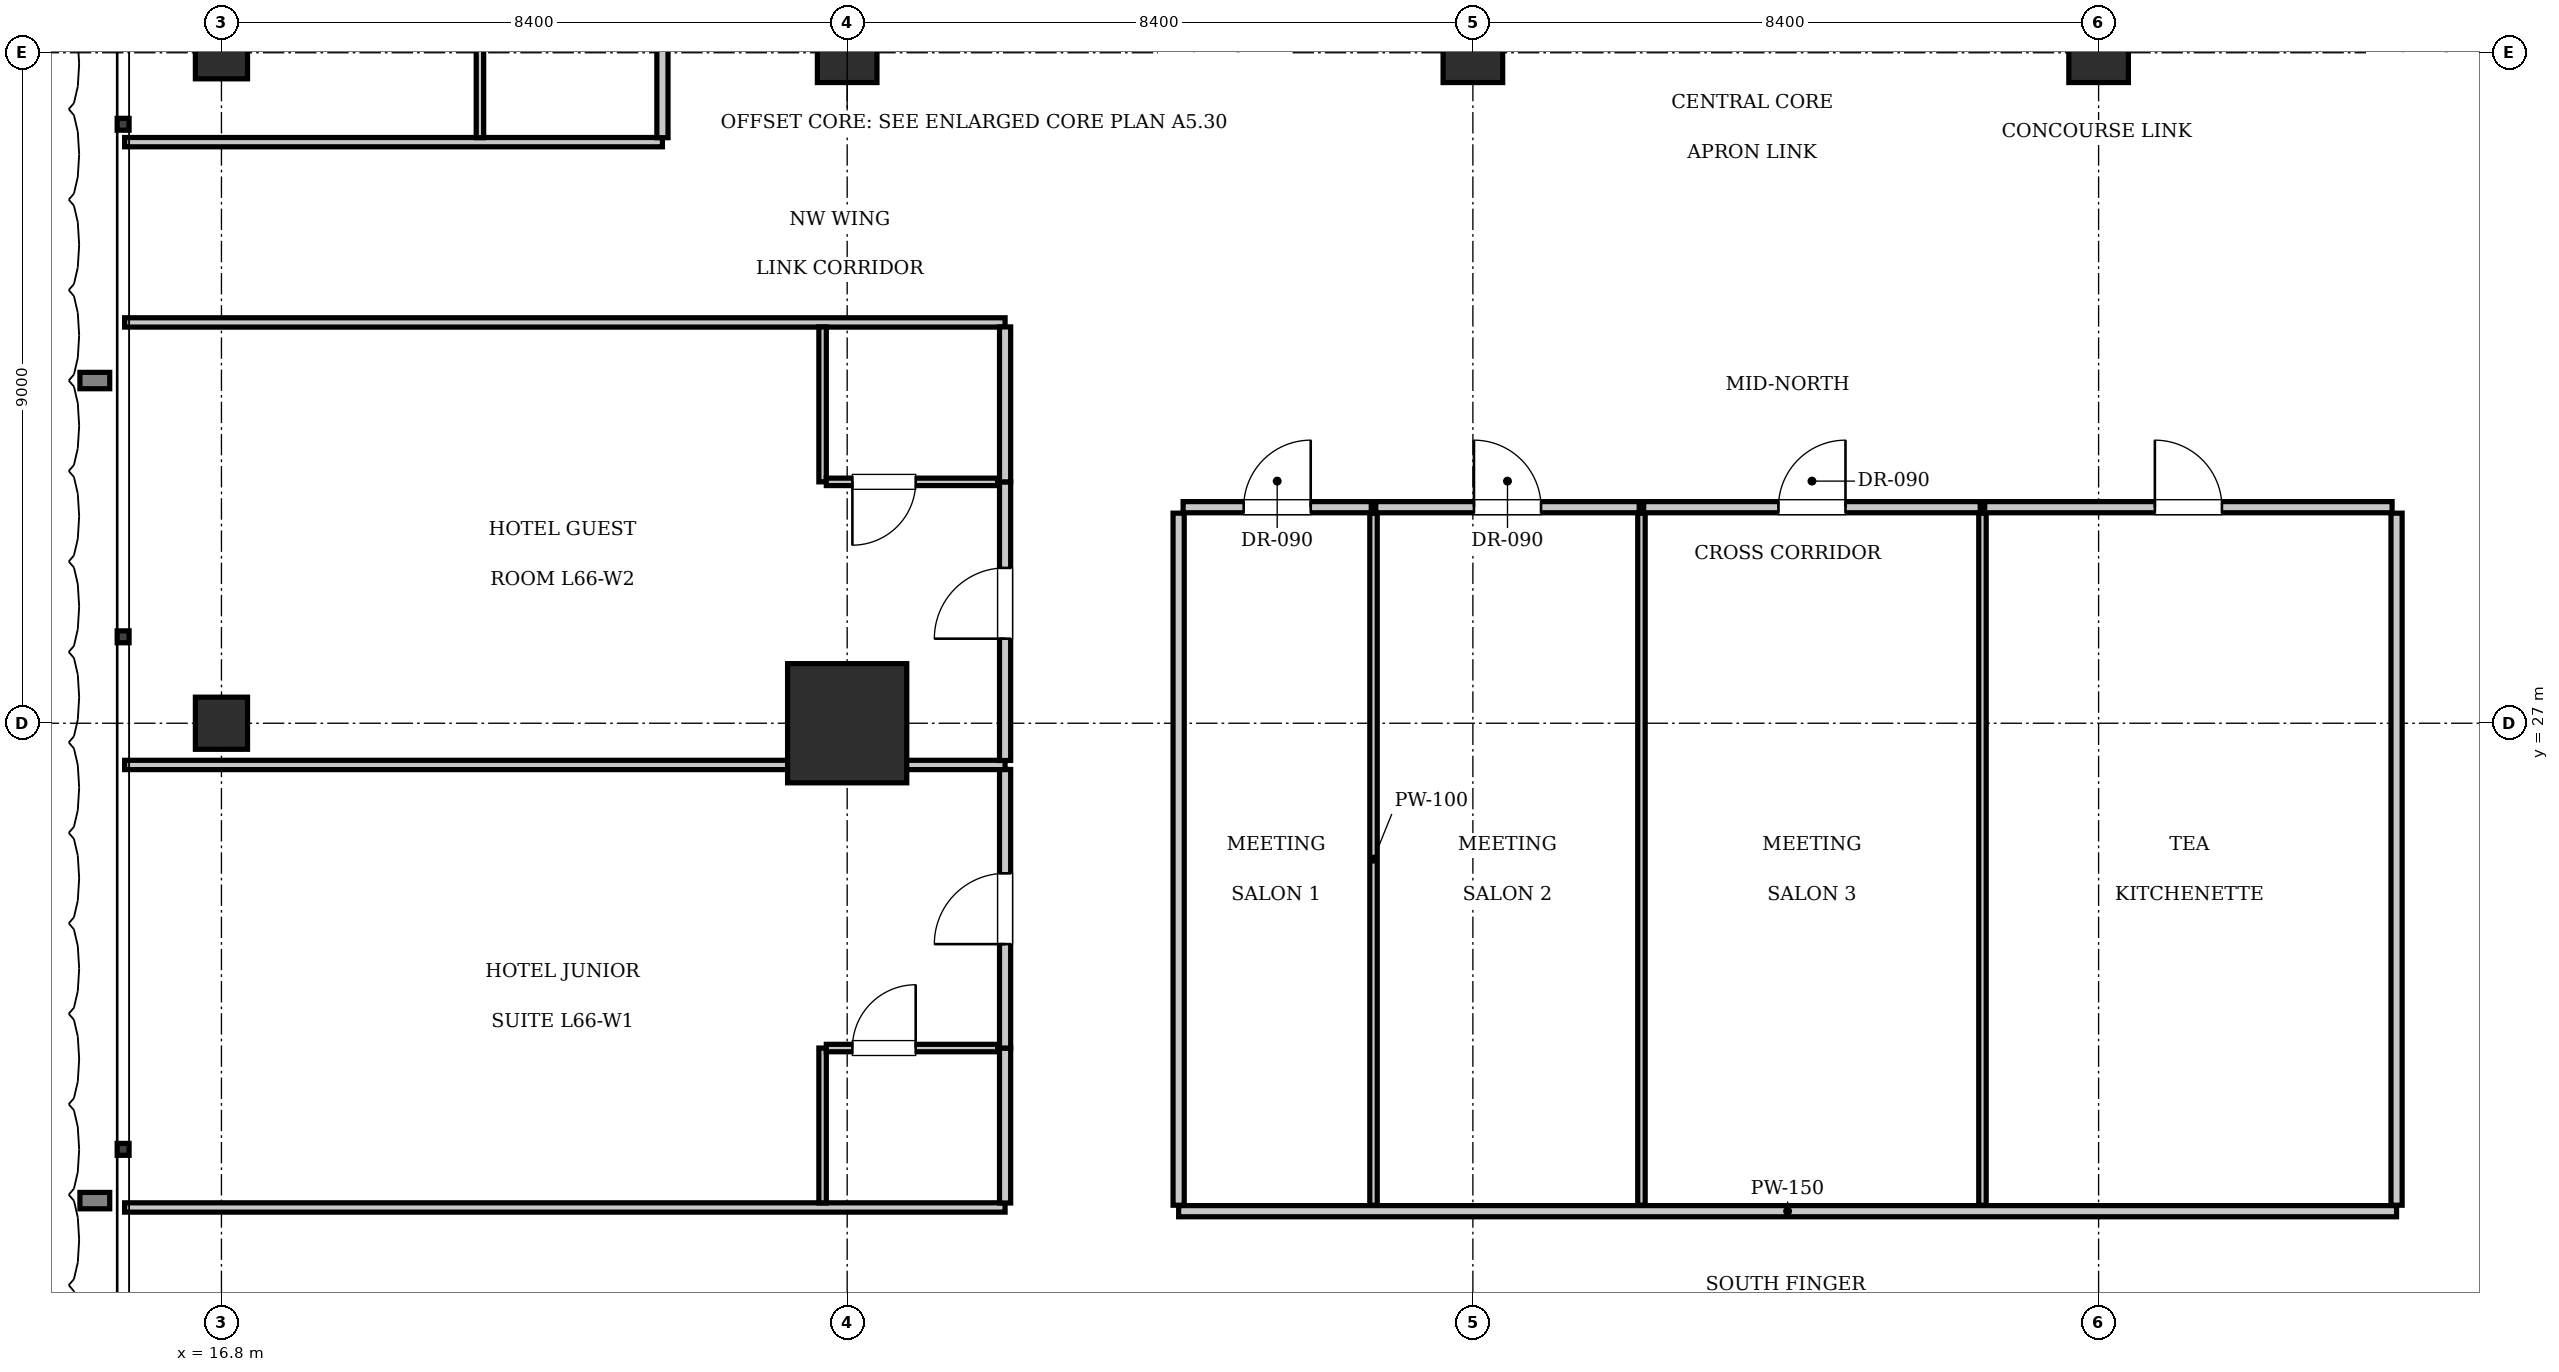
"""IFC4 building model, lengths in metres.
Left out: names, types, materials, properties, quantities, classifications, styles, units other than length and angle.
Written with IfcOpenShell. Run it as: python <this file> out.ifc"""

import sys

from ifc_helpers import new_model, si_unit, direction, frame, frame_2d, origin, origin_2d, place, context, subcontext, project, spatial, rectangle, extrude, element, fill, save


model = new_model("IFC4")
c1 = context("Model", 3, precision=1e-05, world=origin(), true_north=direction((0.0, 1.0)))
c2 = subcontext(c1, "Body", "Model", "MODEL_VIEW")
j1 = project(units=[si_unit("LENGTHUNIT", "METRE"), si_unit("PLANEANGLEUNIT", "RADIAN")], contexts=[c1])
p1 = place(None, origin())
s1 = spatial("IfcSite", under=j1, at=p1, CompositionType="ELEMENT")
p2 = place(p1, origin())
s2 = spatial("IfcBuilding", under=s1, at=p2, CompositionType="ELEMENT")
p3 = place(p2, frame((0.0, 0.0, 270.2)))
s3 = spatial("IfcBuildingStorey", under=s2, at=p3, CompositionType="ELEMENT", Elevation=270.2)
p4 = place(p3, frame((25.2, 27.0, 0.0), z_axis=(0.0, 0.0, 1.0), x_axis=(1.0, 0.0, 0.0)))
e1 = element("IfcColumn", 1, at=p4, inside=s3, PredefinedType="COLUMN", context=c2, shape_type="SweptSolid", body=[
    extrude(rectangle(XDim=1.6, YDim=1.6, at=origin_2d()), origin(), (0.0, 0.0, 1.0), 3.85),
])
for number, where, z_axis, x_axis in (
    (2, (25.2, 36.0, 0.0), (0.0, 0.0, 1.0), (1.0, 0.0, 0.0)),
    (3, (33.6, 36.0, 0.0), (0.0, 0.0, 1.0), (1.0, 0.0, 0.0)),
    (4, (42.0, 36.0, 0.0), (0.0, 0.0, 1.0), (1.0, 0.0, 0.0)),
):
    element("IfcColumn", number, at=place(p3, frame(where, z_axis=z_axis, x_axis=x_axis)), inside=s3, PredefinedType="COLUMN", context=c2, shape_type="SweptSolid", body=[
        extrude(rectangle(XDim=0.8, YDim=0.8, at=origin_2d()), origin(), (0.0, 0.0, 1.0), 3.85),
    ])
for number, where, z_axis, x_axis in (
    (5, (16.8, 27.0, 0.0), (0.0, 0.0, 1.0), (1.0, 0.0, 0.0)),
    (6, (16.8, 36.0, 0.0), (0.0, 0.0, 1.0), (1.0, 0.0, 0.0)),
):
    element("IfcColumn", number, at=place(p3, frame(where, z_axis=z_axis, x_axis=x_axis)), inside=s3, PredefinedType="COLUMN", context=c2, shape_type="SweptSolid", body=[
        extrude(rectangle(XDim=0.7, YDim=0.7, at=origin_2d()), origin(), (0.0, 0.0, 1.0), 3.85),
    ])
p5 = place(p3, frame((29.65, 20.45, 0.0), z_axis=(0.0, 0.0, 1.0), x_axis=(1.0, 0.0, 0.0)))
e7 = element("IfcWall", 7, at=p5, inside=s3, PredefinedType="PARTITIONING", context=c2, shape_type="SweptSolid", body=[
    extrude(rectangle(XDim=16.35, YDim=0.15, at=frame_2d((8.175, 0.0))), origin(), (0.0, 0.0, 1.0), 3.61),
])
for number, where, z_axis, x_axis in (
    (8, (29.65, 20.53, 0.0), (0.0, 0.0, 1.0), (0.0, 1.0, 0.0)),
    (9, (46.0, 20.53, 0.0), (0.0, 0.0, 1.0), (0.0, 1.0, 0.0)),
):
    element("IfcWall", number, at=place(p3, frame(where, z_axis=z_axis, x_axis=x_axis)), inside=s3, PredefinedType="PARTITIONING", context=c2, shape_type="SweptSolid", body=[
        extrude(rectangle(XDim=9.29, YDim=0.15, at=frame_2d((4.645, 0.0))), origin(), (0.0, 0.0, 1.0), 3.61),
    ])
p6 = place(p3, frame((29.71, 29.9, 0.0), z_axis=(0.0, 0.0, 1.0), x_axis=(1.0, 0.0, 0.0)))
e10 = element("IfcWall", 10, at=p6, inside=s3, PredefinedType="PARTITIONING", context=c2, shape_type="SweptSolid", body=[
    extrude(rectangle(XDim=2.526, YDim=0.15, at=frame_2d((1.263, 0.0))), origin(), (0.0, 0.0, 1.0), 3.61),
])
p7 = place(p6, frame((0.813, 0.0, 0.0)))
e11 = element("IfcOpeningElement", 11, at=p7, cuts=e10, PredefinedType="OPENING", context=c2, shape_type="SweptSolid", body=[
    extrude(rectangle(XDim=0.9, YDim=2.1, at=frame_2d((0.45, 1.05))), frame((0.0, 0.085, 0.0), z_axis=(0.0, -1.0, 0.0), x_axis=(1.0, 0.0, 0.0)), (0.0, 0.0, 1.0), 0.17),
])
p8 = place(p3, frame((32.266, 20.53, 0.0), z_axis=(0.0, 0.0, 1.0), x_axis=(0.0, 1.0, 0.0)))
e12 = element("IfcWall", 12, at=p8, inside=s3, PredefinedType="PARTITIONING", context=c2, shape_type="SweptSolid", body=[
    extrude(rectangle(XDim=9.29, YDim=0.1, at=frame_2d((4.645, 0.0))), origin(), (0.0, 0.0, 1.0), 3.61),
])
p9 = place(p3, frame((32.296, 29.9, 0.0), z_axis=(0.0, 0.0, 1.0), x_axis=(1.0, 0.0, 0.0)))
e13 = element("IfcWall", 13, at=p9, inside=s3, PredefinedType="PARTITIONING", context=c2, shape_type="SweptSolid", body=[
    extrude(rectangle(XDim=3.537, YDim=0.15, at=frame_2d((1.769, 0.0))), origin(), (0.0, 0.0, 1.0), 3.61),
])
p10 = place(p9, frame((1.319, 0.0, 0.0)))
e14 = element("IfcOpeningElement", 14, at=p10, cuts=e13, PredefinedType="OPENING", context=c2, shape_type="SweptSolid", body=[
    extrude(rectangle(XDim=0.9, YDim=2.1, at=frame_2d((0.45, 1.05))), frame((0.0, 0.085, 0.0), z_axis=(0.0, -1.0, 0.0), x_axis=(1.0, 0.0, 0.0)), (0.0, 0.0, 1.0), 0.17),
])
p11 = place(p3, frame((35.863, 20.53, 0.0), z_axis=(0.0, 0.0, 1.0), x_axis=(0.0, 1.0, 0.0)))
e15 = element("IfcWall", 15, at=p11, inside=s3, PredefinedType="PARTITIONING", context=c2, shape_type="SweptSolid", body=[
    extrude(rectangle(XDim=9.29, YDim=0.1, at=frame_2d((4.645, 0.0))), origin(), (0.0, 0.0, 1.0), 3.61),
])
p12 = place(p3, frame((35.893, 29.9, 0.0), z_axis=(0.0, 0.0, 1.0), x_axis=(1.0, 0.0, 0.0)))
e16 = element("IfcWall", 16, at=p12, inside=s3, PredefinedType="PARTITIONING", context=c2, shape_type="SweptSolid", body=[
    extrude(rectangle(XDim=4.518, YDim=0.15, at=frame_2d((2.259, 0.0))), origin(), (0.0, 0.0, 1.0), 3.61),
])
p13 = place(p12, frame((1.809, 0.0, 0.0)))
e17 = element("IfcOpeningElement", 17, at=p13, cuts=e16, PredefinedType="OPENING", context=c2, shape_type="SweptSolid", body=[
    extrude(rectangle(XDim=0.9, YDim=2.1, at=frame_2d((0.45, 1.05))), frame((0.0, 0.085, 0.0), z_axis=(0.0, -1.0, 0.0), x_axis=(1.0, 0.0, 0.0)), (0.0, 0.0, 1.0), 0.17),
])
p14 = place(p3, frame((40.441, 20.53, 0.0), z_axis=(0.0, 0.0, 1.0), x_axis=(0.0, 1.0, 0.0)))
e18 = element("IfcWall", 18, at=p14, inside=s3, PredefinedType="PARTITIONING", context=c2, shape_type="SweptSolid", body=[
    extrude(rectangle(XDim=9.29, YDim=0.1, at=frame_2d((4.645, 0.0))), origin(), (0.0, 0.0, 1.0), 3.61),
])
p15 = place(p3, frame((40.471, 29.9, 0.0), z_axis=(0.0, 0.0, 1.0), x_axis=(1.0, 0.0, 0.0)))
e19 = element("IfcWall", 19, at=p15, inside=s3, PredefinedType="PARTITIONING", context=c2, shape_type="SweptSolid", body=[
    extrude(rectangle(XDim=5.469, YDim=0.15, at=frame_2d((2.734, 0.0))), origin(), (0.0, 0.0, 1.0), 3.61),
])
p16 = place(p15, frame((2.284, 0.0, 0.0)))
e20 = element("IfcOpeningElement", 20, at=p16, cuts=e19, PredefinedType="OPENING", context=c2, shape_type="SweptSolid", body=[
    extrude(rectangle(XDim=0.9, YDim=2.1, at=frame_2d((0.45, 1.05))), frame((0.0, 0.085, 0.0), z_axis=(0.0, -1.0, 0.0), x_axis=(1.0, 0.0, 0.0)), (0.0, 0.0, 1.0), 0.17),
])
for number, where, z_axis, x_axis in (
    (21, (15.5, 20.5, 0.0), (0.0, 0.0, 1.0), (1.0, 0.0, 0.0)),
    (22, (15.5, 32.38, 0.0), (0.0, 0.0, 1.0), (1.0, 0.0, 0.0)),
):
    element("IfcWall", number, at=place(p3, frame(where, z_axis=z_axis, x_axis=x_axis)), inside=s3, PredefinedType="PARTITIONING", context=c2, shape_type="SweptSolid", body=[
        extrude(rectangle(XDim=11.82, YDim=0.125, at=frame_2d((5.91, 0.0))), origin(), (0.0, 0.0, 1.0), 3.61),
    ])
p17 = place(p3, frame((27.32, 20.56, 0.0), z_axis=(0.0, 0.0, 1.0), x_axis=(0.0, 1.0, 0.0)))
e23 = element("IfcWall", 23, at=p17, inside=s3, PredefinedType="PARTITIONING", context=c2, shape_type="SweptSolid", body=[
    extrude(rectangle(XDim=2.08, YDim=0.15, at=frame_2d((1.04, 0.0))), origin(), (0.0, 0.0, 1.0), 3.61),
])
p18 = place(p3, frame((27.32, 22.64, 0.0), z_axis=(0.0, 0.0, 1.0), x_axis=(0.0, 1.0, 0.0)))
e24 = element("IfcWall", 24, at=p18, inside=s3, PredefinedType="PARTITIONING", context=c2, shape_type="SweptSolid", body=[
    extrude(rectangle(XDim=3.74, YDim=0.15, at=frame_2d((1.87, 0.0))), origin(), (0.0, 0.0, 1.0), 3.61),
])
p19 = place(p18, frame((1.395, 0.0, 0.0)))
e25 = element("IfcOpeningElement", 25, at=p19, cuts=e24, PredefinedType="OPENING", context=c2, shape_type="SweptSolid", body=[
    extrude(rectangle(XDim=0.95, YDim=2.15, at=frame_2d((0.475, 1.075))), frame((0.0, 0.085, 0.0), z_axis=(0.0, -1.0, 0.0), x_axis=(1.0, 0.0, 0.0)), (0.0, 0.0, 1.0), 0.17),
])
p20 = place(p3, frame((24.87, 20.56, 0.0), z_axis=(0.0, 0.0, 1.0), x_axis=(0.0, 1.0, 0.0)))
e26 = element("IfcWall", 26, at=p20, inside=s3, PredefinedType="PARTITIONING", context=c2, shape_type="SweptSolid", body=[
    extrude(rectangle(XDim=2.08, YDim=0.1, at=frame_2d((1.04, 0.0))), origin(), (0.0, 0.0, 1.0), 3.61),
])
p21 = place(p3, frame((24.92, 22.64, 0.0), z_axis=(0.0, 0.0, 1.0), x_axis=(1.0, 0.0, 0.0)))
e27 = element("IfcWall", 27, at=p21, inside=s3, PredefinedType="PARTITIONING", context=c2, shape_type="SweptSolid", body=[
    extrude(rectangle(XDim=2.3, YDim=0.1, at=frame_2d((1.15, 0.0))), origin(), (0.0, 0.0, 1.0), 3.61),
])
p22 = place(p21, frame((0.35, 0.0, 0.0)))
e28 = element("IfcOpeningElement", 28, at=p22, cuts=e27, PredefinedType="OPENING", context=c2, shape_type="SweptSolid", body=[
    extrude(rectangle(XDim=0.85, YDim=2.1, at=frame_2d((0.425, 1.05))), frame((0.0, 0.06, 0.0), z_axis=(0.0, -1.0, 0.0), x_axis=(1.0, 0.0, 0.0)), (0.0, 0.0, 1.0), 0.12),
])
p23 = place(p3, frame((15.5, 26.44, 0.0), z_axis=(0.0, 0.0, 1.0), x_axis=(1.0, 0.0, 0.0)))
e29 = element("IfcWall", 29, at=p23, inside=s3, PredefinedType="PARTITIONING", context=c2, shape_type="SweptSolid", body=[
    extrude(rectangle(XDim=11.82, YDim=0.125, at=frame_2d((5.91, 0.0))), origin(), (0.0, 0.0, 1.0), 3.61),
])
p24 = place(p3, frame((27.32, 26.5, 0.0), z_axis=(0.0, 0.0, 1.0), x_axis=(0.0, 1.0, 0.0)))
e30 = element("IfcWall", 30, at=p24, inside=s3, PredefinedType="PARTITIONING", context=c2, shape_type="SweptSolid", body=[
    extrude(rectangle(XDim=3.74, YDim=0.15, at=frame_2d((1.87, 0.0))), origin(), (0.0, 0.0, 1.0), 3.61),
])
p25 = place(p24, frame((1.635, 0.0, 0.0)))
e31 = element("IfcOpeningElement", 31, at=p25, cuts=e30, PredefinedType="OPENING", context=c2, shape_type="SweptSolid", body=[
    extrude(rectangle(XDim=0.95, YDim=2.15, at=frame_2d((0.475, 1.075))), frame((0.0, 0.085, 0.0), z_axis=(0.0, -1.0, 0.0), x_axis=(1.0, 0.0, 0.0)), (0.0, 0.0, 1.0), 0.17),
])
p26 = place(p3, frame((27.32, 30.24, 0.0), z_axis=(0.0, 0.0, 1.0), x_axis=(0.0, 1.0, 0.0)))
e32 = element("IfcWall", 32, at=p26, inside=s3, PredefinedType="PARTITIONING", context=c2, shape_type="SweptSolid", body=[
    extrude(rectangle(XDim=2.08, YDim=0.15, at=frame_2d((1.04, 0.0))), origin(), (0.0, 0.0, 1.0), 3.61),
])
p27 = place(p3, frame((24.87, 30.24, 0.0), z_axis=(0.0, 0.0, 1.0), x_axis=(0.0, 1.0, 0.0)))
e33 = element("IfcWall", 33, at=p27, inside=s3, PredefinedType="PARTITIONING", context=c2, shape_type="SweptSolid", body=[
    extrude(rectangle(XDim=2.08, YDim=0.1, at=frame_2d((1.04, 0.0))), origin(), (0.0, 0.0, 1.0), 3.61),
])
p28 = place(p3, frame((24.92, 30.24, 0.0), z_axis=(0.0, 0.0, 1.0), x_axis=(1.0, 0.0, 0.0)))
e34 = element("IfcWall", 34, at=p28, inside=s3, PredefinedType="PARTITIONING", context=c2, shape_type="SweptSolid", body=[
    extrude(rectangle(XDim=2.3, YDim=0.1, at=frame_2d((1.15, 0.0))), origin(), (0.0, 0.0, 1.0), 3.61),
])
p29 = place(p28, frame((0.35, 0.0, 0.0)))
e35 = element("IfcOpeningElement", 35, at=p29, cuts=e34, PredefinedType="OPENING", context=c2, shape_type="SweptSolid", body=[
    extrude(rectangle(XDim=0.85, YDim=2.1, at=frame_2d((0.425, 1.05))), frame((0.0, 0.06, 0.0), z_axis=(0.0, -1.0, 0.0), x_axis=(1.0, 0.0, 0.0)), (0.0, 0.0, 1.0), 0.12),
])
p30 = place(p3, frame((15.5, 34.8, 0.0), z_axis=(0.0, 0.0, 1.0), x_axis=(1.0, 0.0, 0.0)))
e36 = element("IfcWall", 36, at=p30, inside=s3, PredefinedType="PARTITIONING", context=c2, shape_type="SweptSolid", body=[
    extrude(rectangle(XDim=7.22, YDim=0.125, at=frame_2d((3.61, 0.0))), origin(), (0.0, 0.0, 1.0), 3.61),
])
p31 = place(p3, frame((22.72, 34.86, 0.0), z_axis=(0.0, 0.0, 1.0), x_axis=(0.0, 1.0, 0.0)))
e37 = element("IfcWall", 37, at=p31, inside=s3, PredefinedType="PARTITIONING", context=c2, shape_type="SweptSolid", body=[
    extrude(rectangle(XDim=2.29, YDim=0.15, at=frame_2d((1.145, 0.0))), origin(), (0.0, 0.0, 1.0), 3.61),
])
p32 = place(p3, frame((20.27, 34.86, 0.0), z_axis=(0.0, 0.0, 1.0), x_axis=(0.0, 1.0, 0.0)))
e38 = element("IfcWall", 38, at=p32, inside=s3, PredefinedType="PARTITIONING", context=c2, shape_type="SweptSolid", body=[
    extrude(rectangle(XDim=2.29, YDim=0.1, at=frame_2d((1.145, 0.0))), origin(), (0.0, 0.0, 1.0), 3.61),
])
p33 = place(p7, origin())
e39 = element("IfcDoor", 39, at=p33, inside=s3, OperationType="SINGLE_SWING_RIGHT", PredefinedType="DOOR", context=c2, shape_type="SweptSolid", body=[
    extrude(rectangle(XDim=0.9, YDim=2.1, at=frame_2d((0.45, 1.05))), frame((0.0, 0.025, 0.0), z_axis=(0.0, -1.0, 0.0), x_axis=(1.0, 0.0, 0.0)), (0.0, 0.0, 1.0), 0.05),
])
fill(e11, e39)
p34 = place(p10, origin())
e40 = element("IfcDoor", 40, at=p34, inside=s3, OperationType="SINGLE_SWING_LEFT", PredefinedType="DOOR", context=c2, shape_type="SweptSolid", body=[
    extrude(rectangle(XDim=0.9, YDim=2.1, at=frame_2d((0.45, 1.05))), frame((0.0, 0.025, 0.0), z_axis=(0.0, -1.0, 0.0), x_axis=(1.0, 0.0, 0.0)), (0.0, 0.0, 1.0), 0.05),
])
fill(e14, e40)
p35 = place(p13, origin())
e41 = element("IfcDoor", 41, at=p35, inside=s3, OperationType="SINGLE_SWING_RIGHT", PredefinedType="DOOR", context=c2, shape_type="SweptSolid", body=[
    extrude(rectangle(XDim=0.9, YDim=2.1, at=frame_2d((0.45, 1.05))), frame((0.0, 0.025, 0.0), z_axis=(0.0, -1.0, 0.0), x_axis=(1.0, 0.0, 0.0)), (0.0, 0.0, 1.0), 0.05),
])
fill(e17, e41)
p36 = place(p16, origin())
e42 = element("IfcDoor", 42, at=p36, inside=s3, OperationType="SINGLE_SWING_LEFT", PredefinedType="DOOR", context=c2, shape_type="SweptSolid", body=[
    extrude(rectangle(XDim=0.9, YDim=2.1, at=frame_2d((0.45, 1.05))), frame((0.0, 0.025, 0.0), z_axis=(0.0, -1.0, 0.0), x_axis=(1.0, 0.0, 0.0)), (0.0, 0.0, 1.0), 0.05),
])
fill(e20, e42)
p37 = place(p22, origin())
e43 = element("IfcDoor", 43, at=p37, inside=s3, OperationType="SINGLE_SWING_RIGHT", PredefinedType="DOOR", context=c2, shape_type="SweptSolid", body=[
    extrude(rectangle(XDim=0.85, YDim=2.1, at=frame_2d((0.425, 1.05))), frame((0.0, 0.025, 0.0), z_axis=(0.0, -1.0, 0.0), x_axis=(1.0, 0.0, 0.0)), (0.0, 0.0, 1.0), 0.05),
])
fill(e28, e43)
p38 = place(p19, origin())
e44 = element("IfcDoor", 44, at=p38, inside=s3, OperationType="SINGLE_SWING_LEFT", PredefinedType="DOOR", context=c2, shape_type="SweptSolid", body=[
    extrude(rectangle(XDim=0.95, YDim=2.15, at=frame_2d((0.475, 1.075))), frame((0.0, 0.025, 0.0), z_axis=(0.0, -1.0, 0.0), x_axis=(1.0, 0.0, 0.0)), (0.0, 0.0, 1.0), 0.05),
])
fill(e25, e44)
p39 = place(p29, frame((0.85, 0.0, 0.0), z_axis=(0.0, 0.0, 1.0), x_axis=(-1.0, 0.0, 0.0)))
e45 = element("IfcDoor", 45, at=p39, inside=s3, OperationType="SINGLE_SWING_RIGHT", PredefinedType="DOOR", context=c2, shape_type="SweptSolid", body=[
    extrude(rectangle(XDim=0.85, YDim=2.1, at=frame_2d((0.425, 1.05))), frame((0.0, 0.025, 0.0), z_axis=(0.0, -1.0, 0.0), x_axis=(1.0, 0.0, 0.0)), (0.0, 0.0, 1.0), 0.05),
])
fill(e35, e45)
p40 = place(p25, origin())
e46 = element("IfcDoor", 46, at=p40, inside=s3, OperationType="SINGLE_SWING_LEFT", PredefinedType="DOOR", context=c2, shape_type="SweptSolid", body=[
    extrude(rectangle(XDim=0.95, YDim=2.15, at=frame_2d((0.475, 1.075))), frame((0.0, 0.025, 0.0), z_axis=(0.0, -1.0, 0.0), x_axis=(1.0, 0.0, 0.0)), (0.0, 0.0, 1.0), 0.05),
])
fill(e31, e46)
save(model, sys.argv[1])
